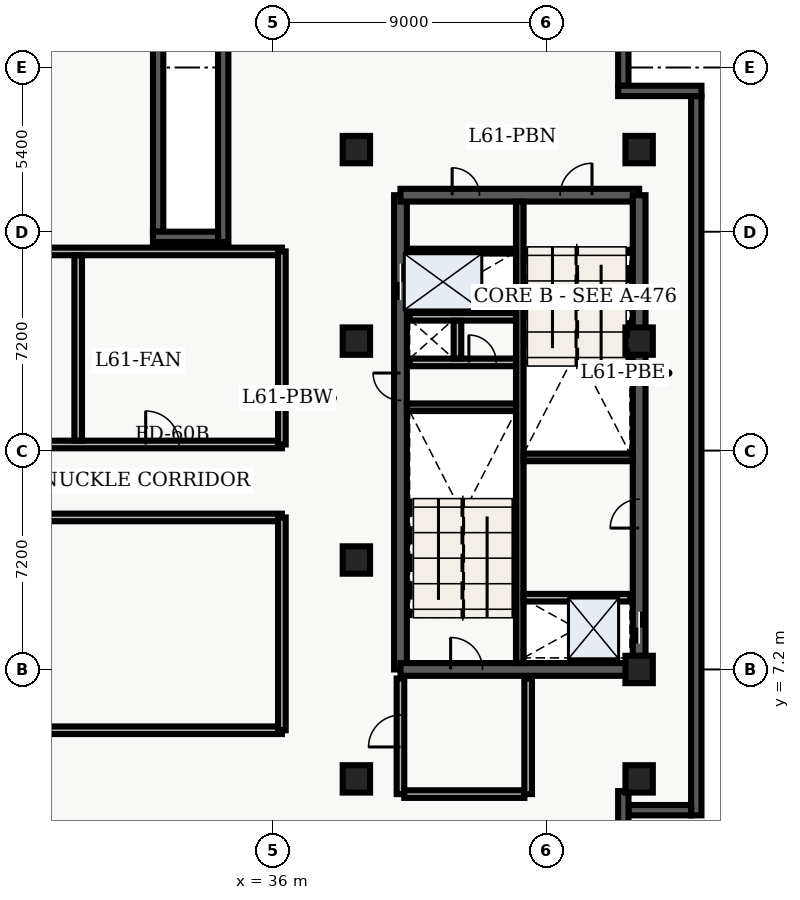
"""IFC4 building model, lengths in metres.
Left out: names, types, materials, properties, quantities, classifications, styles, units other than length and angle.
Written with IfcOpenShell. Run it as: python <this file> out.ifc"""

import sys

from ifc_helpers import new_model, entity, si_unit, converted_unit, direction, frame, origin_with_axes, origin_2d_with_axis, place, context, subcontext, project, spatial, polyline, rectangle, outline, extrude, element, fill, save


model = new_model("IFC4")
c1 = context("Model", 3, precision=1e-05, world=origin_with_axes(), true_north=direction((0.0, 1.0)))
c2 = subcontext(c1, "Body", "Model", "MODEL_VIEW")
j1 = project(units=[si_unit("LENGTHUNIT", "METRE"), converted_unit("PLANEANGLEUNIT", "DEGREE", entity("IfcPlaneAngleMeasure", 0.017), si_unit("PLANEANGLEUNIT", "RADIAN"), dimensions=[0, 0, 0, 0, 0, 0, 0])], contexts=[c1])
p1 = place(None, origin_with_axes())
s1 = spatial("IfcSite", under=j1, at=p1, CompositionType="ELEMENT")
p2 = place(p1, origin_with_axes())
s2 = spatial("IfcBuilding", under=s1, at=p2, CompositionType="ELEMENT")
p3 = place(p2, frame((0.0, 0.0, 248.1), z_axis=(0.0, 0.0, 1.0), x_axis=(1.0, 0.0, 0.0)))
s3 = spatial("IfcBuildingStorey", under=s2, at=p3, CompositionType="ELEMENT", Elevation=248.1)
p4 = place(p3, frame((40.2, 7.2, 0.0), z_axis=(0.0, 0.0, 1.0), x_axis=(0.0, 1.0, 0.0)))
e1 = element("IfcWall", 1, at=p4, inside=s3, PredefinedType="SHEAR", context=c2, shape_type="SweptSolid", body=[
    extrude(outline(polyline([(0.0, -0.21), (15.6, -0.21), (15.6, 0.21), (0.0, 0.21), (0.0, -0.21)])), origin_with_axes(), (0.0, 0.0, 1.0), 4.56),
])
p5 = place(p4, frame((12.75, 0.0, 0.0), z_axis=(0.0, 0.0, 1.0), x_axis=(1.0, 0.0, 0.0)))
e2 = element("IfcOpeningElement", 2, at=p5, cuts=e1, PredefinedType="OPENING", context=c2, shape_type="SweptSolid", body=[
    extrude(rectangle(XDim=1.2, YDim=0.44, at=origin_2d_with_axis()), origin_with_axes(), (0.0, 0.0, 1.0), 2.15),
])
p6 = place(p4, frame((9.3, 0.0, 0.0), z_axis=(0.0, 0.0, 1.0), x_axis=(1.0, 0.0, 0.0)))
e3 = element("IfcOpeningElement", 3, at=p6, cuts=e1, PredefinedType="OPENING", context=c2, shape_type="SweptSolid", body=[
    extrude(rectangle(XDim=0.9, YDim=0.44, at=origin_2d_with_axis()), origin_with_axes(), (0.0, 0.0, 1.0), 2.15),
])
p7 = place(p3, frame((40.2, 7.2, 0.0), z_axis=(0.0, 0.0, 1.0), x_axis=(1.0, 0.0, 0.0)))
e4 = element("IfcWall", 4, at=p7, inside=s3, PredefinedType="SHEAR", context=c2, shape_type="SweptSolid", body=[
    extrude(outline(polyline([(0.0, -0.21), (7.85, -0.21), (7.85, 0.21), (0.0, 0.21), (0.0, -0.21)])), origin_with_axes(), (0.0, 0.0, 1.0), 4.56),
])
p8 = place(p7, frame((2.175, 0.0, 0.0), z_axis=(0.0, 0.0, 1.0), x_axis=(1.0, 0.0, 0.0)))
e5 = element("IfcOpeningElement", 5, at=p8, cuts=e4, PredefinedType="OPENING", context=c2, shape_type="SweptSolid", body=[
    extrude(rectangle(XDim=1.05, YDim=0.44, at=origin_2d_with_axis()), origin_with_axes(), (0.0, 0.0, 1.0), 2.15),
])
p9 = place(p3, frame((40.2, 22.8, 0.0), z_axis=(0.0, 0.0, 1.0), x_axis=(1.0, 0.0, 0.0)))
e6 = element("IfcWall", 6, at=p9, inside=s3, PredefinedType="SHEAR", context=c2, shape_type="SweptSolid", body=[
    extrude(outline(polyline([(0.0, -0.21), (7.85, -0.21), (7.85, 0.21), (0.0, 0.21), (0.0, -0.21)])), origin_with_axes(), (0.0, 0.0, 1.0), 4.56),
])
p10 = place(p9, frame((5.775, 0.0, 0.0), z_axis=(0.0, 0.0, 1.0), x_axis=(1.0, 0.0, 0.0)))
e7 = element("IfcOpeningElement", 7, at=p10, cuts=e6, PredefinedType="OPENING", context=c2, shape_type="SweptSolid", body=[
    extrude(rectangle(XDim=1.05, YDim=0.44, at=origin_2d_with_axis()), origin_with_axes(), (0.0, 0.0, 1.0), 2.15),
])
p11 = place(p9, frame((2.15, 0.0, 0.0), z_axis=(0.0, 0.0, 1.0), x_axis=(1.0, 0.0, 0.0)))
e8 = element("IfcOpeningElement", 8, at=p11, cuts=e6, PredefinedType="OPENING", context=c2, shape_type="SweptSolid", body=[
    extrude(rectangle(XDim=0.9, YDim=0.44, at=origin_2d_with_axis()), origin_with_axes(), (0.0, 0.0, 1.0), 2.15),
])
p12 = place(p3, frame((48.05, 7.2, 0.0), z_axis=(0.0, 0.0, 1.0), x_axis=(0.0, 1.0, 0.0)))
e9 = element("IfcWall", 9, at=p12, inside=s3, PredefinedType="SHEAR", context=c2, shape_type="SweptSolid", body=[
    extrude(outline(polyline([(0.0, -0.21), (15.6, -0.21), (15.6, 0.21), (0.0, 0.21), (0.0, -0.21)])), origin_with_axes(), (0.0, 0.0, 1.0), 4.56),
])
p13 = place(p12, frame((1.375, 0.0, 0.0), z_axis=(0.0, 0.0, 1.0), x_axis=(1.0, 0.0, 0.0)))
e10 = element("IfcOpeningElement", 10, at=p13, cuts=e9, PredefinedType="OPENING", context=c2, shape_type="SweptSolid", body=[
    extrude(rectangle(XDim=1.05, YDim=0.44, at=origin_2d_with_axis()), origin_with_axes(), (0.0, 0.0, 1.0), 2.15),
])
p14 = place(p12, frame((5.125, 0.0, 0.0), z_axis=(0.0, 0.0, 1.0), x_axis=(1.0, 0.0, 0.0)))
e11 = element("IfcOpeningElement", 11, at=p14, cuts=e9, PredefinedType="OPENING", context=c2, shape_type="SweptSolid", body=[
    extrude(rectangle(XDim=0.95, YDim=0.44, at=origin_2d_with_axis()), origin_with_axes(), (0.0, 0.0, 1.0), 2.15),
])
p15 = place(p3, frame((44.125, 7.41, 0.0), z_axis=(0.0, 0.0, 1.0), x_axis=(0.0, 1.0, 0.0)))
e12 = element("IfcWall", 12, at=p15, inside=s3, PredefinedType="SHEAR", context=c2, shape_type="SweptSolid", body=[
    extrude(outline(polyline([(0.0, -0.125), (15.18, -0.125), (15.18, 0.125), (0.0, 0.125), (0.0, -0.125)])), origin_with_axes(), (0.0, 0.0, 1.0), 4.56),
])
for number, where, z_axis, x_axis in (
    (13, (40.41, 15.825, 0.0), (0.0, 0.0, 1.0), (1.0, 0.0, 0.0)),
    (14, (44.25, 14.175, 0.0), (0.0, 0.0, 1.0), (1.0, 0.0, 0.0)),
):
    element("IfcWall", number, at=place(p3, frame(where, z_axis=z_axis, x_axis=x_axis)), inside=s3, PredefinedType="SHEAR", context=c2, shape_type="SweptSolid", body=[
        extrude(outline(polyline([(0.0, -0.125), (3.59, -0.125), (3.59, 0.125), (0.0, 0.125), (0.0, -0.125)])), origin_with_axes(), (0.0, 0.0, 1.0), 4.56),
    ])
p16 = place(p3, frame((40.5, 17.3, 0.0), z_axis=(0.0, 0.0, 1.0), x_axis=(1.0, 0.0, 0.0)))
e15 = element("IfcWall", 15, at=p16, inside=s3, PredefinedType="SOLIDWALL", context=c2, shape_type="SweptSolid", body=[
    extrude(outline(polyline([(0.0, -0.125), (3.5, -0.125), (3.5, 0.125), (0.0, 0.125), (0.0, -0.125)])), origin_with_axes(), (0.0, 0.0, 1.0), 3.6),
])
p17 = place(p16, frame((2.4, 0.0, 0.0), z_axis=(0.0, 0.0, 1.0), x_axis=(1.0, 0.0, 0.0)))
e16 = element("IfcOpeningElement", 16, at=p17, cuts=e15, PredefinedType="OPENING", context=c2, shape_type="SweptSolid", body=[
    extrude(rectangle(XDim=0.9, YDim=0.27, at=origin_2d_with_axis()), origin_with_axes(), (0.0, 0.0, 1.0), 2.15),
])
p18 = place(p3, frame((40.5, 18.8, 0.0), z_axis=(0.0, 0.0, 1.0), x_axis=(1.0, 0.0, 0.0)))
e17 = element("IfcWall", 17, at=p18, inside=s3, PredefinedType="SOLIDWALL", context=c2, shape_type="SweptSolid", body=[
    extrude(outline(polyline([(0.0, -0.125), (3.5, -0.125), (3.5, 0.125), (0.0, 0.125), (0.0, -0.125)])), origin_with_axes(), (0.0, 0.0, 1.0), 3.6),
])
p19 = place(p3, frame((42.075, 17.43, 0.0), z_axis=(0.0, 0.0, 1.0), x_axis=(0.0, 1.0, 0.0)))
e18 = element("IfcWall", 18, at=p19, inside=s3, PredefinedType="SOLIDWALL", context=c2, shape_type="SweptSolid", body=[
    extrude(outline(polyline([(0.0, -0.125), (1.24, -0.125), (1.24, 0.125), (0.0, 0.125), (0.0, -0.125)])), origin_with_axes(), (0.0, 0.0, 1.0), 3.6),
])
p20 = place(p3, frame((40.2, 3.1, 0.0), z_axis=(0.0, 0.0, 1.0), x_axis=(0.0, 1.0, 0.0)))
e19 = element("IfcWall", 19, at=p20, inside=s3, PredefinedType="SOLIDWALL", context=c2, shape_type="SweptSolid", body=[
    extrude(outline(polyline([(0.0, -0.125), (3.8, -0.125), (3.8, 0.125), (0.0, 0.125), (0.0, -0.125)])), origin_with_axes(), (0.0, 0.0, 1.0), 3.6),
])
p21 = place(p20, frame((2.075, 0.0, 0.0), z_axis=(0.0, 0.0, 1.0), x_axis=(1.0, 0.0, 0.0)))
e20 = element("IfcOpeningElement", 20, at=p21, cuts=e19, PredefinedType="OPENING", context=c2, shape_type="SweptSolid", body=[
    extrude(rectangle(XDim=1.05, YDim=0.27, at=origin_2d_with_axis()), origin_with_axes(), (0.0, 0.0, 1.0), 2.15),
])
p22 = place(p3, frame((40.325, 3.1, 0.0), z_axis=(0.0, 0.0, 1.0), x_axis=(1.0, 0.0, 0.0)))
e21 = element("IfcWall", 21, at=p22, inside=s3, PredefinedType="SOLIDWALL", context=c2, shape_type="SweptSolid", body=[
    extrude(outline(polyline([(0.0, -0.125), (3.95, -0.125), (3.95, 0.125), (0.0, 0.125), (0.0, -0.125)])), origin_with_axes(), (0.0, 0.0, 1.0), 3.6),
])
p23 = place(p3, frame((44.4, 3.1, 0.0), z_axis=(0.0, 0.0, 1.0), x_axis=(0.0, 1.0, 0.0)))
e22 = element("IfcWall", 22, at=p23, inside=s3, PredefinedType="SOLIDWALL", context=c2, shape_type="SweptSolid", body=[
    extrude(outline(polyline([(0.0, -0.125), (3.8, -0.125), (3.8, 0.125), (0.0, 0.125), (0.0, -0.125)])), origin_with_axes(), (0.0, 0.0, 1.0), 3.6),
])
for number, where, z_axis, x_axis in (
    (23, (38.75, 3.6, 0.0), (0.0, 0.0, 1.0), (1.0, 0.0, 0.0)),
    (24, (38.75, 10.8, 0.0), (0.0, 0.0, 1.0), (1.0, 0.0, 0.0)),
    (25, (38.75, 18.0, 0.0), (0.0, 0.0, 1.0), (1.0, 0.0, 0.0)),
    (26, (38.75, 24.3, 0.0), (0.0, 0.0, 1.0), (1.0, 0.0, 0.0)),
    (27, (48.05, 3.6, 0.0), (0.0, 0.0, 1.0), (1.0, 0.0, 0.0)),
    (28, (48.05, 7.2, 0.0), (0.0, 0.0, 1.0), (1.0, 0.0, 0.0)),
    (29, (48.05, 18.0, 0.0), (0.0, 0.0, 1.0), (1.0, 0.0, 0.0)),
    (30, (48.05, 24.3, 0.0), (0.0, 0.0, 1.0), (1.0, 0.0, 0.0)),
):
    element("IfcColumn", number, at=place(p3, frame(where, z_axis=z_axis, x_axis=x_axis)), inside=s3, PredefinedType="COLUMN", context=c2, shape_type="SweptSolid", body=[
        extrude(rectangle(XDim=0.9, YDim=0.9, at=origin_2d_with_axis()), origin_with_axes(), (0.0, 0.0, 1.0), 4.8),
    ])
p24 = place(p3, frame((40.5, 20.96, 0.0), z_axis=(0.0, 0.0, 1.0), x_axis=(1.0, 0.0, 0.0)))
e31 = element("IfcWall", 31, at=p24, inside=s3, PredefinedType="PARTITIONING", context=c2, shape_type="SweptSolid", body=[
    extrude(outline(polyline([(0.0, -0.08), (3.5, -0.08), (3.5, 0.08), (0.0, 0.08), (0.0, -0.08)])), origin_with_axes(), (0.0, 0.0, 1.0), 3.2),
])
p25 = place(p3, frame((44.25, 9.56, 0.0), z_axis=(0.0, 0.0, 1.0), x_axis=(1.0, 0.0, 0.0)))
e32 = element("IfcWall", 32, at=p25, inside=s3, PredefinedType="SOLIDWALL", context=c2, shape_type="SweptSolid", body=[
    extrude(outline(polyline([(0.0, -0.125), (3.5, -0.125), (3.5, 0.125), (0.0, 0.125), (0.0, -0.125)])), origin_with_axes(), (0.0, 0.0, 1.0), 3.2),
])
for number, where, z_axis, x_axis in (
    (33, (21.22, 20.95, 0.0), (0.0, 0.0, 1.0), (1.0, 0.0, 0.0)),
    (34, (21.22, 12.2, 0.0), (0.0, 0.0, 1.0), (1.0, 0.0, 0.0)),
):
    element("IfcWall", number, at=place(p3, frame(where, z_axis=z_axis, x_axis=x_axis)), inside=s3, PredefinedType="SOLIDWALL", context=c2, shape_type="SweptSolid", body=[
        extrude(outline(polyline([(0.0, -0.125), (15.08, -0.125), (15.08, 0.125), (0.0, 0.125), (0.0, -0.125)])), origin_with_axes(), (0.0, 0.0, 1.0), 3.2),
    ])
p26 = place(p3, frame((21.22, 14.6, 0.0), z_axis=(0.0, 0.0, 1.0), x_axis=(1.0, 0.0, 0.0)))
e35 = element("IfcWall", 35, at=p26, inside=s3, PredefinedType="SOLIDWALL", context=c2, shape_type="SweptSolid", body=[
    extrude(outline(polyline([(0.0, -0.125), (15.08, -0.125), (15.08, 0.125), (0.0, 0.125), (0.0, -0.125)])), origin_with_axes(), (0.0, 0.0, 1.0), 3.2),
])
p27 = place(p26, frame((11.15, 0.0, 0.0), z_axis=(0.0, 0.0, 1.0), x_axis=(1.0, 0.0, 0.0)))
e36 = element("IfcOpeningElement", 36, at=p27, cuts=e35, PredefinedType="OPENING", context=c2, shape_type="SweptSolid", body=[
    extrude(rectangle(XDim=1.1, YDim=0.27, at=origin_2d_with_axis()), origin_with_axes(), (0.0, 0.0, 1.0), 2.15),
])
p28 = place(p3, frame((36.3, 14.6, 0.0), z_axis=(0.0, 0.0, 1.0), x_axis=(0.0, 1.0, 0.0)))
e37 = element("IfcWall", 37, at=p28, inside=s3, PredefinedType="SOLIDWALL", context=c2, shape_type="SweptSolid", body=[
    extrude(outline(polyline([(0.0, -0.125), (6.35, -0.125), (6.35, 0.125), (0.0, 0.125), (0.0, -0.125)])), origin_with_axes(), (0.0, 0.0, 1.0), 3.2),
])
p29 = place(p3, frame((29.6, 14.73, 0.0), z_axis=(0.0, 0.0, 1.0), x_axis=(0.0, 1.0, 0.0)))
e38 = element("IfcWall", 38, at=p29, inside=s3, PredefinedType="SOLIDWALL", context=c2, shape_type="SweptSolid", body=[
    extrude(outline(polyline([(0.0, -0.125), (6.09, -0.125), (6.09, 0.125), (0.0, 0.125), (0.0, -0.125)])), origin_with_axes(), (0.0, 0.0, 1.0), 3.2),
])
p30 = place(p3, frame((21.22, 5.2, 0.0), z_axis=(0.0, 0.0, 1.0), x_axis=(1.0, 0.0, 0.0)))
e39 = element("IfcWall", 39, at=p30, inside=s3, PredefinedType="SOLIDWALL", context=c2, shape_type="SweptSolid", body=[
    extrude(outline(polyline([(0.0, -0.125), (15.08, -0.125), (15.08, 0.125), (0.0, 0.125), (0.0, -0.125)])), origin_with_axes(), (0.0, 0.0, 1.0), 3.2),
])
p31 = place(p3, frame((36.3, 5.2, 0.0), z_axis=(0.0, 0.0, 1.0), x_axis=(0.0, 1.0, 0.0)))
e40 = element("IfcWall", 40, at=p31, inside=s3, PredefinedType="SOLIDWALL", context=c2, shape_type="SweptSolid", body=[
    extrude(outline(polyline([(0.0, -0.125), (7.0, -0.125), (7.0, 0.125), (0.0, 0.125), (0.0, -0.125)])), origin_with_axes(), (0.0, 0.0, 1.0), 3.2),
])
p32 = place(p3, frame((34.37, 21.26, 0.0), z_axis=(0.0, 0.0, 1.0), x_axis=(0.0, 1.0, 0.0)))
e41 = element("IfcWall", 41, at=p32, inside=s3, PredefinedType="SOLIDWALL", context=c2, shape_type="SweptSolid", body=[
    extrude(outline(polyline([(0.0, -0.17), (7.54, -0.17), (7.54, 0.17), (0.0, 0.17), (0.0, -0.17)])), origin_with_axes(), (0.0, 0.0, 1.0), 4.56),
])
p33 = place(p3, frame((47.53, 28.46, 0.0), z_axis=(0.0, 0.0, 1.0), x_axis=(0.0, -1.0, 0.0)))
e42 = element("IfcWall", 42, at=p33, inside=s3, PredefinedType="SOLIDWALL", context=c2, shape_type="SweptSolid", body=[
    extrude(outline(polyline([(0.0, -0.17), (2.06, -0.17), (2.06, 0.17), (0.0, 0.17), (0.0, -0.17)])), origin_with_axes(), (0.0, 0.0, 1.0), 4.56),
])
p34 = place(p3, frame((47.36, 26.23, 0.0), z_axis=(0.0, 0.0, 1.0), x_axis=(1.0, 0.0, 0.0)))
e43 = element("IfcWall", 43, at=p34, inside=s3, PredefinedType="SOLIDWALL", context=c2, shape_type="SweptSolid", body=[
    extrude(outline(polyline([(0.0, -0.17), (2.74, -0.17), (2.74, 0.17), (0.0, 0.17), (0.0, -0.17)])), origin_with_axes(), (0.0, 0.0, 1.0), 4.56),
])
p35 = place(p3, frame((49.93, 26.06, 0.0), z_axis=(0.0, 0.0, 1.0), x_axis=(0.0, -1.0, 0.0)))
e44 = element("IfcWall", 44, at=p35, inside=s3, PredefinedType="SOLIDWALL", context=c2, shape_type="SweptSolid", body=[
    extrude(outline(polyline([(0.0, -0.17), (23.66, -0.17), (23.66, 0.17), (0.0, 0.17), (0.0, -0.17)])), origin_with_axes(), (0.0, 0.0, 1.0), 4.56),
])
p36 = place(p3, frame((49.76, 2.57, 0.0), z_axis=(0.0, 0.0, 1.0), x_axis=(-1.0, 0.0, 0.0)))
e45 = element("IfcWall", 45, at=p36, inside=s3, PredefinedType="SOLIDWALL", context=c2, shape_type="SweptSolid", body=[
    extrude(outline(polyline([(0.0, -0.17), (2.06, -0.17), (2.06, 0.17), (0.0, 0.17), (0.0, -0.17)])), origin_with_axes(), (0.0, 0.0, 1.0), 4.56),
])
p37 = place(p3, frame((47.53, 3.2, 0.0), z_axis=(0.0, 0.0, 1.0), x_axis=(0.0, -1.0, 0.0)))
e46 = element("IfcWall", 46, at=p37, inside=s3, PredefinedType="SOLIDWALL", context=c2, shape_type="SweptSolid", body=[
    extrude(outline(polyline([(0.0, -0.17), (3.2, -0.17), (3.2, 0.17), (0.0, 0.17), (0.0, -0.17)])), origin_with_axes(), (0.0, 0.0, 1.0), 4.56),
])
p38 = place(p3, frame((32.23, 41.82, 0.0), z_axis=(0.0, 0.0, 1.0), x_axis=(0.0, -1.0, 0.0)))
e47 = element("IfcWall", 47, at=p38, inside=s3, PredefinedType="SOLIDWALL", context=c2, shape_type="SweptSolid", body=[
    extrude(outline(polyline([(0.0, -0.17), (20.22, -0.17), (20.22, 0.17), (0.0, 0.17), (0.0, -0.17)])), origin_with_axes(), (0.0, 0.0, 1.0), 4.56),
])
p39 = place(p3, frame((32.06, 21.43, 0.0), z_axis=(0.0, 0.0, 1.0), x_axis=(1.0, 0.0, 0.0)))
e48 = element("IfcWall", 48, at=p39, inside=s3, PredefinedType="SOLIDWALL", context=c2, shape_type="SweptSolid", body=[
    extrude(outline(polyline([(0.0, -0.17), (2.14, -0.17), (2.14, 0.17), (0.0, 0.17), (0.0, -0.17)])), origin_with_axes(), (0.0, 0.0, 1.0), 4.56),
])
p40 = place(p12, frame((1.375, 0.0, 0.0), z_axis=(0.0, 0.0, 1.0), x_axis=(1.0, 0.0, 0.0)))
e49 = element("IfcDoor", 49, at=p40, inside=s3, OperationType="SLIDING_TO_LEFT", PredefinedType="DOOR", context=c2, shape_type="SweptSolid", body=[
    extrude(rectangle(XDim=1.05, YDim=0.09, at=origin_2d_with_axis()), origin_with_axes(), (0.0, 0.0, 1.0), 2.15),
])
fill(e10, e49)
p41 = place(p4, frame((12.75, 0.0, 0.0), z_axis=(0.0, 0.0, 1.0), x_axis=(1.0, 0.0, 0.0)))
e50 = element("IfcDoor", 50, at=p41, inside=s3, OperationType="DOUBLE_DOOR_SLIDING", PredefinedType="DOOR", context=c2, shape_type="SweptSolid", body=[
    extrude(rectangle(XDim=1.2, YDim=0.09, at=origin_2d_with_axis()), origin_with_axes(), (0.0, 0.0, 1.0), 2.15),
])
fill(e2, e50)
p42 = place(p4, frame((9.3, 0.0, 0.0), z_axis=(0.0, 0.0, 1.0), x_axis=(1.0, 0.0, 0.0)))
e51 = element("IfcDoor", 51, at=p42, inside=s3, OperationType="SINGLE_SWING_RIGHT", PredefinedType="DOOR", context=c2, shape_type="SweptSolid", body=[
    extrude(rectangle(XDim=0.9, YDim=0.09, at=origin_2d_with_axis()), origin_with_axes(), (0.0, 0.0, 1.0), 2.15),
])
fill(e3, e51)
p43 = place(p16, frame((2.4, 0.0, 0.0), z_axis=(0.0, 0.0, 1.0), x_axis=(1.0, 0.0, 0.0)))
e52 = element("IfcDoor", 52, at=p43, inside=s3, OperationType="SINGLE_SWING_LEFT", PredefinedType="DOOR", context=c2, shape_type="SweptSolid", body=[
    extrude(rectangle(XDim=0.9, YDim=0.09, at=origin_2d_with_axis()), origin_with_axes(), (0.0, 0.0, 1.0), 2.15),
])
fill(e16, e52)
p44 = place(p7, frame((2.175, 0.0, 0.0), z_axis=(0.0, 0.0, 1.0), x_axis=(1.0, 0.0, 0.0)))
e53 = element("IfcDoor", 53, at=p44, inside=s3, OperationType="SINGLE_SWING_LEFT", PredefinedType="DOOR", context=c2, shape_type="SweptSolid", body=[
    extrude(rectangle(XDim=1.05, YDim=0.09, at=origin_2d_with_axis()), origin_with_axes(), (0.0, 0.0, 1.0), 2.15),
])
fill(e5, e53)
p45 = place(p9, frame((5.775, 0.0, 0.0), z_axis=(0.0, 0.0, 1.0), x_axis=(1.0, 0.0, 0.0)))
e54 = element("IfcDoor", 54, at=p45, inside=s3, OperationType="SINGLE_SWING_RIGHT", PredefinedType="DOOR", context=c2, shape_type="SweptSolid", body=[
    extrude(rectangle(XDim=1.05, YDim=0.09, at=origin_2d_with_axis()), origin_with_axes(), (0.0, 0.0, 1.0), 2.15),
])
fill(e7, e54)
p46 = place(p20, frame((2.075, 0.0, 0.0), z_axis=(0.0, 0.0, 1.0), x_axis=(1.0, 0.0, 0.0)))
e55 = element("IfcDoor", 55, at=p46, inside=s3, OperationType="SINGLE_SWING_LEFT", PredefinedType="DOOR", context=c2, shape_type="SweptSolid", body=[
    extrude(rectangle(XDim=1.05, YDim=0.09, at=origin_2d_with_axis()), origin_with_axes(), (0.0, 0.0, 1.0), 2.15),
])
fill(e20, e55)
p47 = place(p9, frame((2.15, 0.0, 0.0), z_axis=(0.0, 0.0, 1.0), x_axis=(1.0, 0.0, 0.0)))
e56 = element("IfcDoor", 56, at=p47, inside=s3, OperationType="SINGLE_SWING_LEFT", PredefinedType="DOOR", context=c2, shape_type="SweptSolid", body=[
    extrude(rectangle(XDim=0.9, YDim=0.09, at=origin_2d_with_axis()), origin_with_axes(), (0.0, 0.0, 1.0), 2.15),
])
fill(e8, e56)
p48 = place(p12, frame((5.125, 0.0, 0.0), z_axis=(0.0, 0.0, 1.0), x_axis=(1.0, 0.0, 0.0)))
e57 = element("IfcDoor", 57, at=p48, inside=s3, OperationType="SINGLE_SWING_LEFT", PredefinedType="DOOR", context=c2, shape_type="SweptSolid", body=[
    extrude(rectangle(XDim=0.95, YDim=0.09, at=origin_2d_with_axis()), origin_with_axes(), (0.0, 0.0, 1.0), 2.15),
])
fill(e11, e57)
p49 = place(p26, frame((11.15, 0.0, 0.0), z_axis=(0.0, 0.0, 1.0), x_axis=(1.0, 0.0, 0.0)))
e58 = element("IfcDoor", 58, at=p49, inside=s3, OperationType="SINGLE_SWING_LEFT", PredefinedType="DOOR", context=c2, shape_type="SweptSolid", body=[
    extrude(rectangle(XDim=1.1, YDim=0.09, at=origin_2d_with_axis()), origin_with_axes(), (0.0, 0.0, 1.0), 2.15),
])
fill(e36, e58)
save(model, sys.argv[1])
